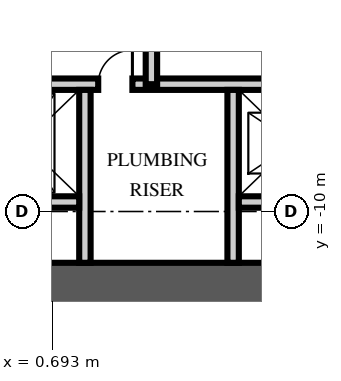
"""IFC4 building model, lengths in metres.
Left out: names, types, materials, properties, quantities, classifications, styles, units other than length and angle.
Written with IfcOpenShell. Run it as: python <this file> out.ifc"""

import sys

from ifc_helpers import new_model, si_unit, direction, frame, frame_2d, origin, place, context, subcontext, project, spatial, rectangle, extrude, element, fill, save


model = new_model("IFC4")
c1 = context("Model", 3, precision=1e-05, world=origin(), true_north=direction((0.0, 1.0)))
c2 = subcontext(c1, "Body", "Model", "MODEL_VIEW")
j1 = project(units=[si_unit("LENGTHUNIT", "METRE"), si_unit("PLANEANGLEUNIT", "RADIAN")], contexts=[c1])
p1 = place(None, origin())
s1 = spatial("IfcSite", under=j1, at=p1, CompositionType="ELEMENT")
p2 = place(p1, origin())
s2 = spatial("IfcBuilding", under=s1, at=p2, CompositionType="ELEMENT")
p3 = place(p2, frame((0.0, 0.0, 353.25)))
s3 = spatial("IfcBuildingStorey", under=s2, at=p3, CompositionType="ELEMENT", Elevation=353.25)
p4 = place(p3, frame((-15.5, -12.0, -0.3), z_axis=(0.0, 0.0, 1.0), x_axis=(1.0, 0.0, 0.0)))
e1 = element("IfcWall", 1, at=p4, inside=s3, PredefinedType="SHEAR", context=c2, shape_type="SweptSolid", body=[
    extrude(rectangle(XDim=31.0, YDim=1.3, at=frame_2d((15.5, 0.0))), origin(), (0.0, 0.0, 1.0), 5.0),
])
p5 = place(p3, frame((-8.5, -6.65, 0.0), z_axis=(0.0, 0.0, 1.0), x_axis=(1.0, 0.0, 0.0)))
e2 = element("IfcWall", 2, at=p5, inside=s3, PredefinedType="PARTITIONING", context=c2, shape_type="SweptSolid", body=[
    extrude(rectangle(XDim=17.0, YDim=0.3, at=frame_2d((8.5, 0.0))), origin(), (0.0, 0.0, 1.0), 4.7),
])
p6 = place(p5, frame((7.8, 0.0, 0.0)))
e3 = element("IfcOpeningElement", 3, at=p6, cuts=e2, PredefinedType="OPENING", context=c2, shape_type="SweptSolid", body=[
    extrude(rectangle(XDim=1.3, YDim=2.4, at=frame_2d((0.65, 1.2))), frame((0.0, 0.16, 0.0), z_axis=(0.0, -1.0, 0.0), x_axis=(1.0, 0.0, 0.0)), (0.0, 0.0, 1.0), 0.32),
])
p7 = place(p5, frame((5.65, 0.0, 0.0)))
e4 = element("IfcOpeningElement", 4, at=p7, cuts=e2, PredefinedType="OPENING", context=c2, shape_type="SweptSolid", body=[
    extrude(rectangle(XDim=0.9, YDim=2.1, at=frame_2d((0.45, 1.05))), frame((0.0, 0.16, 0.0), z_axis=(0.0, -1.0, 0.0), x_axis=(1.0, 0.0, 0.0)), (0.0, 0.0, 1.0), 0.32),
])
p8 = place(p5, frame((10.4, 0.0, 0.0)))
e5 = element("IfcOpeningElement", 5, at=p8, cuts=e2, PredefinedType="OPENING", context=c2, shape_type="SweptSolid", body=[
    extrude(rectangle(XDim=0.9, YDim=2.1, at=frame_2d((0.45, 1.05))), frame((0.0, 0.16, 0.0), z_axis=(0.0, -1.0, 0.0), x_axis=(1.0, 0.0, 0.0)), (0.0, 0.0, 1.0), 0.32),
])
for number, where, z_axis, x_axis in (
    (6, (1.55, -11.35, 0.0), (0.0, 0.0, 1.0), (0.0, 1.0, 0.0)),
    (7, (5.45, -11.35, 0.0), (0.0, 0.0, 1.0), (0.0, 1.0, 0.0)),
):
    element("IfcWall", number, at=place(p3, frame(where, z_axis=z_axis, x_axis=x_axis)), inside=s3, PredefinedType="PARTITIONING", context=c2, shape_type="SweptSolid", body=[
        extrude(rectangle(XDim=4.55, YDim=0.3, at=frame_2d((2.275, 0.0))), origin(), (0.0, 0.0, 1.0), 4.7),
    ])
for number, where, z_axis, x_axis in (
    (8, (-1.5, -9.75, 0.0), (0.0, 0.0, 1.0), (1.0, 0.0, 0.0)),
    (9, (5.6, -9.75, 0.0), (0.0, 0.0, 1.0), (1.0, 0.0, 0.0)),
):
    element("IfcWall", number, at=place(p3, frame(where, z_axis=z_axis, x_axis=x_axis)), inside=s3, PredefinedType="PARTITIONING", context=c2, shape_type="SweptSolid", body=[
        extrude(rectangle(XDim=2.9, YDim=0.3, at=frame_2d((1.45, 0.0))), origin(), (0.0, 0.0, 1.0), 4.7),
    ])
p9 = place(p3, frame((3.3, -6.65, 0.0), z_axis=(0.0, 0.0, 1.0), x_axis=(0.0, 1.0, 0.0)))
e10 = element("IfcWall", 10, at=p9, inside=s3, PredefinedType="PARTITIONING", context=c2, shape_type="SweptSolid", body=[
    extrude(rectangle(XDim=8.65, YDim=0.3, at=frame_2d((4.325, 0.0))), origin(), (0.0, 0.0, 1.0), 4.7),
])
p10 = place(p9, frame((3.875, 0.0, 0.0)))
e11 = element("IfcOpeningElement", 11, at=p10, cuts=e10, PredefinedType="OPENING", context=c2, shape_type="SweptSolid", body=[
    extrude(rectangle(XDim=0.9, YDim=2.1, at=frame_2d((0.45, 1.05))), frame((0.0, 0.16, 0.0), z_axis=(0.0, -1.0, 0.0), x_axis=(1.0, 0.0, 0.0)), (0.0, 0.0, 1.0), 0.32),
])
p11 = place(p8, origin())
e12 = element("IfcDoor", 12, at=p11, inside=s3, OperationType="SINGLE_SWING_RIGHT", PredefinedType="DOOR", context=c2, shape_type="SweptSolid", body=[
    extrude(rectangle(XDim=0.9, YDim=2.1, at=frame_2d((0.45, 1.05))), frame((0.0, 0.025, 0.0), z_axis=(0.0, -1.0, 0.0), x_axis=(1.0, 0.0, 0.0)), (0.0, 0.0, 1.0), 0.05),
])
fill(e5, e12)
save(model, sys.argv[1])
